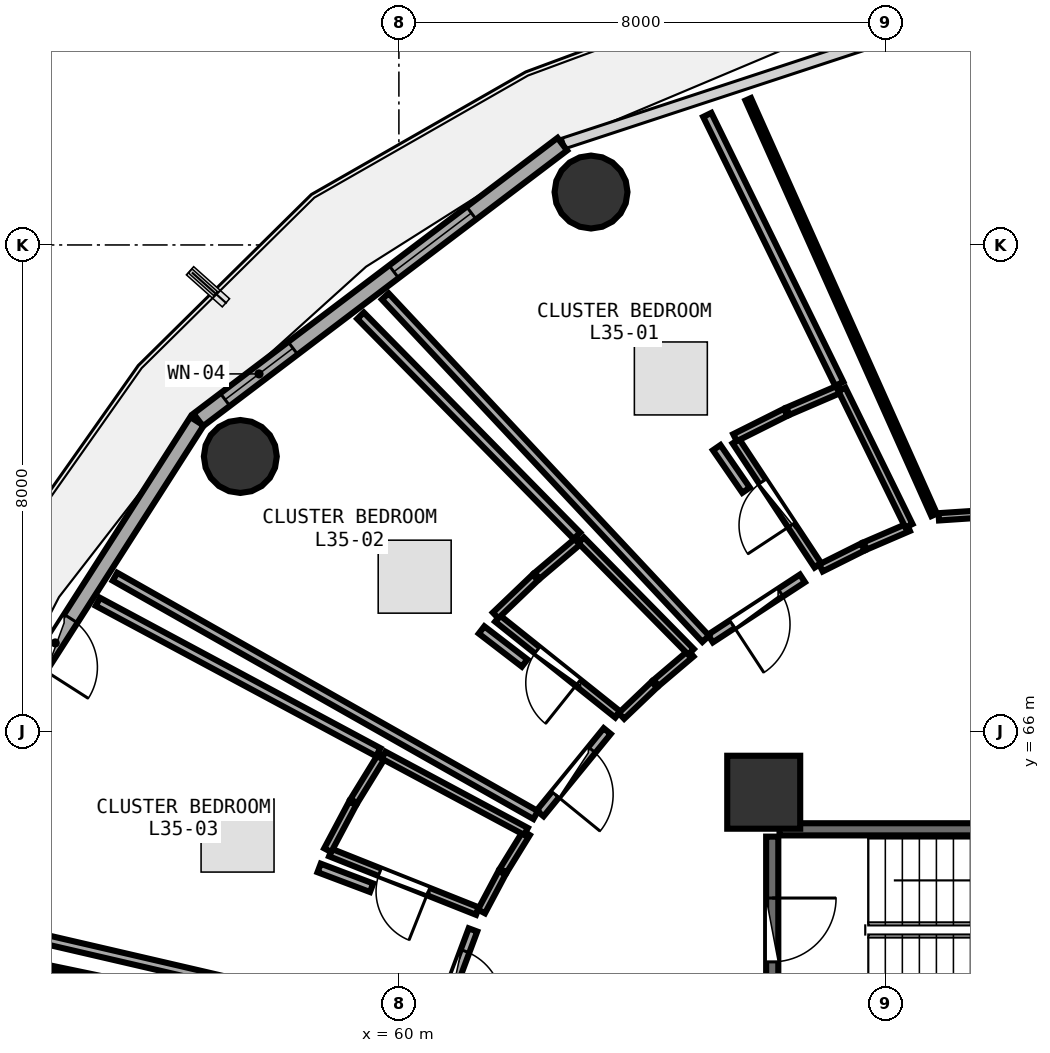
"""IFC4 building model, lengths in metres.
Left out: names, types, materials, properties, quantities, classifications, styles, units other than length and angle.
Written with IfcOpenShell. Run it as: python <this file> out.ifc"""

import sys

from ifc_helpers import new_model, si_unit, direction, frame, frame_2d, origin, origin_2d, place, context, subcontext, project, spatial, rectangle, circle, extrude, element, fill, save


model = new_model("IFC4")
c1 = context("Model", 3, precision=1e-05, world=origin(), true_north=direction((0.0, 1.0)))
c2 = subcontext(c1, "Body", "Model", "MODEL_VIEW")
j1 = project(units=[si_unit("LENGTHUNIT", "METRE"), si_unit("PLANEANGLEUNIT", "RADIAN")], contexts=[c1])
p1 = place(None, origin())
s1 = spatial("IfcSite", under=j1, at=p1, CompositionType="ELEMENT")
p2 = place(p1, origin())
s2 = spatial("IfcBuilding", under=s1, at=p2, CompositionType="ELEMENT")
p3 = place(p2, frame((0.0, 0.0, 139.35)))
s3 = spatial("IfcBuildingStorey", under=s2, at=p3, CompositionType="ELEMENT", Elevation=139.35)
p4 = place(p3, frame((66.0, 65.0, 0.0), z_axis=(0.0, 0.0, 1.0), x_axis=(1.0, 0.0, 0.0)))
e1 = element("IfcColumn", 1, at=p4, inside=s3, PredefinedType="PILASTER", context=c2, shape_type="SweptSolid", body=[
    extrude(rectangle(XDim=1.2, YDim=1.2, at=origin_2d()), origin(), (0.0, 0.0, 1.0), 3.75),
])
for number, where, z_axis, x_axis in (
    (2, (63.16, 74.87, 0.0), (0.0, 0.0, 1.0), (1.0, 0.0, 0.0)),
    (3, (57.392, 70.521, 0.0), (0.0, 0.0, 1.0), (1.0, 0.0, 0.0)),
):
    element("IfcColumn", number, at=place(p3, frame(where, z_axis=z_axis, x_axis=x_axis)), inside=s3, PredefinedType="COLUMN", context=c2, shape_type="SweptSolid", body=[
        extrude(circle(Radius=0.6, at=origin_2d()), origin(), (0.0, 0.0, 1.0), 3.75),
    ])
p5 = place(p3, frame((62.688, 75.658, 0.0), z_axis=(0.0, 0.0, 1.0), x_axis=(-0.797163719609, -0.603763202042, 0.0)))
e4 = element("IfcWall", 4, at=p5, inside=s3, PredefinedType="SOLIDWALL", context=c2, shape_type="SweptSolid", body=[
    extrude(rectangle(XDim=7.512, YDim=0.26, at=frame_2d((3.756, 0.0))), origin(), (0.0, 0.0, 1.0), 3.475),
])
p6 = place(p5, frame((1.876, 0.0, 0.85)))
e5 = element("IfcOpeningElement", 5, at=p6, cuts=e4, PredefinedType="OPENING", context=c2, shape_type="SweptSolid", body=[
    extrude(rectangle(XDim=1.6, YDim=1.45, at=frame_2d((0.8, 0.725))), frame((0.0, 0.14, 0.0), z_axis=(0.0, -1.0, 0.0), x_axis=(1.0, 0.0, 0.0)), (0.0, 0.0, 1.0), 0.28),
])
p7 = place(p5, frame((5.558, 0.0, 0.85)))
e6 = element("IfcOpeningElement", 6, at=p7, cuts=e4, PredefinedType="OPENING", context=c2, shape_type="SweptSolid", body=[
    extrude(rectangle(XDim=1.4, YDim=1.45, at=frame_2d((0.7, 0.725))), frame((0.0, 0.14, 0.0), z_axis=(0.0, -1.0, 0.0), x_axis=(1.0, 0.0, 0.0)), (0.0, 0.0, 1.0), 0.28),
])
p8 = place(p3, frame((56.679, 71.1, 0.0), z_axis=(0.0, 0.0, 1.0), x_axis=(-0.538801521808, -0.842432739213, 0.0)))
e7 = element("IfcWall", 7, at=p8, inside=s3, PredefinedType="SOLIDWALL", context=c2, shape_type="SweptSolid", body=[
    extrude(rectangle(XDim=7.253, YDim=0.26, at=frame_2d((3.627, 0.0))), origin(), (0.0, 0.0, 1.0), 3.475),
])
p9 = place(p8, frame((3.852, 0.0, 0.0)))
e8 = element("IfcOpeningElement", 8, at=p9, cuts=e7, PredefinedType="OPENING", context=c2, shape_type="SweptSolid", body=[
    extrude(rectangle(XDim=0.95, YDim=2.1, at=frame_2d((0.475, 1.05))), frame((0.0, 0.14, 0.0), z_axis=(0.0, -1.0, 0.0), x_axis=(1.0, 0.0, 0.0)), (0.0, 0.0, 1.0), 0.28),
])
p10 = place(p8, frame((5.152, 0.0, 0.85)))
e9 = element("IfcOpeningElement", 9, at=p10, cuts=e7, PredefinedType="OPENING", context=c2, shape_type="SweptSolid", body=[
    extrude(rectangle(XDim=1.2, YDim=1.45, at=frame_2d((0.6, 0.725))), frame((0.0, 0.14, 0.0), z_axis=(0.0, -1.0, 0.0), x_axis=(1.0, 0.0, 0.0)), (0.0, 0.0, 1.0), 0.28),
])
p11 = place(p3, frame((73.42, 64.39, 0.0), z_axis=(0.0, 0.0, 1.0), x_axis=(-1.0, 0.0, 0.0)))
e10 = element("IfcWall", 10, at=p11, inside=s3, PredefinedType="SHEAR", context=c2, shape_type="SweptSolid", body=[
    extrude(rectangle(XDim=7.16, YDim=0.2, at=frame_2d((3.58, 0.0))), origin(), (0.0, 0.0, 1.0), 3.49),
])
p12 = place(p3, frame((66.14, 64.27, 0.0), z_axis=(0.0, 0.0, 1.0), x_axis=(0.0, -1.0, 0.0)))
e11 = element("IfcWall", 11, at=p12, inside=s3, PredefinedType="SHEAR", context=c2, shape_type="SweptSolid", body=[
    extrude(rectangle(XDim=3.07, YDim=0.2, at=frame_2d((1.535, 0.0))), origin(), (0.0, 0.0, 1.0), 3.49),
])
p13 = place(p12, frame((1.01, 0.0, 0.0)))
e12 = element("IfcOpeningElement", 12, at=p13, cuts=e11, PredefinedType="OPENING", context=c2, shape_type="SweptSolid", body=[
    extrude(rectangle(XDim=1.05, YDim=2.1, at=frame_2d((0.525, 1.05))), frame((0.0, 0.11, 0.0), z_axis=(0.0, -1.0, 0.0), x_axis=(1.0, 0.0, 0.0)), (0.0, 0.0, 1.0), 0.22),
])
p14 = place(p3, frame((77.169, 70.083, 0.0), z_axis=(0.0, 0.0, 1.0), x_axis=(-0.997775005058, -0.066671127793, 0.0)))
e13 = element("IfcWall", 13, at=p14, inside=s3, PredefinedType="PARTITIONING", context=c2, shape_type="SweptSolid", body=[
    extrude(rectangle(XDim=8.309, YDim=0.12, at=frame_2d((4.154, 0.0))), origin(), (0.0, 0.0, 1.0), 2.975),
])
p15 = place(p14, frame((3.704, 0.0, 0.0)))
e14 = element("IfcOpeningElement", 14, at=p15, cuts=e13, PredefinedType="OPENING", context=c2, shape_type="SweptSolid", body=[
    extrude(rectangle(XDim=0.9, YDim=2.08, at=frame_2d((0.45, 1.04))), frame((0.0, 0.07, 0.0), z_axis=(0.0, -1.0, 0.0), x_axis=(1.0, 0.0, 0.0)), (0.0, 0.0, 1.0), 0.14),
])
p16 = place(p3, frame((66.891, 68.73, 0.0), z_axis=(0.0, 0.0, 1.0), x_axis=(-0.550825526042, 0.834620416633, 0.0)))
e15 = element("IfcWall", 15, at=p16, inside=s3, PredefinedType="PLUMBINGWALL", context=c2, shape_type="SweptSolid", body=[
    extrude(rectangle(XDim=2.447, YDim=0.13, at=frame_2d((1.223, 0.0))), origin(), (0.0, 0.0, 1.0), 3.235),
])
p17 = place(p16, frame((0.793, 0.0, 0.0)))
e16 = element("IfcOpeningElement", 16, at=p17, cuts=e15, PredefinedType="OPENING", context=c2, shape_type="SweptSolid", body=[
    extrude(rectangle(XDim=0.86, YDim=2.05, at=frame_2d((0.43, 1.025))), frame((0.0, 0.075, 0.0), z_axis=(0.0, -1.0, 0.0), x_axis=(1.0, 0.0, 0.0)), (0.0, 0.0, 1.0), 0.15),
])
p18 = place(p3, frame((66.637, 68.517, 0.0), z_axis=(0.0, 0.0, 1.0), x_axis=(-0.836795974783, -0.547514836864, 0.0)))
e17 = element("IfcWall", 17, at=p18, inside=s3, PredefinedType="PARTITIONING", context=c2, shape_type="SweptSolid", body=[
    extrude(rectangle(XDim=1.809, YDim=0.15, at=frame_2d((0.904, 0.0))), origin(), (0.0, 0.0, 1.0), 2.975),
])
p19 = place(p18, frame((0.429, 0.0, 0.0)))
e18 = element("IfcOpeningElement", 18, at=p19, cuts=e17, PredefinedType="OPENING", context=c2, shape_type="SweptSolid", body=[
    extrude(rectangle(XDim=0.95, YDim=2.08, at=frame_2d((0.475, 1.04))), frame((0.0, 0.085, 0.0), z_axis=(0.0, -1.0, 0.0), x_axis=(1.0, 0.0, 0.0)), (0.0, 0.0, 1.0), 0.17),
])
p20 = place(p3, frame((63.599, 66.278, 0.0), z_axis=(0.0, 0.0, 1.0), x_axis=(-0.781386491078, 0.624047395284, 0.0)))
e19 = element("IfcWall", 19, at=p20, inside=s3, PredefinedType="PLUMBINGWALL", context=c2, shape_type="SweptSolid", body=[
    extrude(rectangle(XDim=2.529, YDim=0.13, at=frame_2d((1.265, 0.0))), origin(), (0.0, 0.0, 1.0), 2.975),
])
p21 = place(p20, frame((0.835, 0.0, 0.0)))
e20 = element("IfcOpeningElement", 20, at=p21, cuts=e19, PredefinedType="OPENING", context=c2, shape_type="SweptSolid", body=[
    extrude(rectangle(XDim=0.86, YDim=2.05, at=frame_2d((0.43, 1.025))), frame((0.0, 0.075, 0.0), z_axis=(0.0, -1.0, 0.0), x_axis=(1.0, 0.0, 0.0)), (0.0, 0.0, 1.0), 0.15),
])
p22 = place(p3, frame((63.426, 66.006, 0.0), z_axis=(0.0, 0.0, 1.0), x_axis=(-0.63192798372, -0.775027111391, 0.0)))
e21 = element("IfcWall", 21, at=p22, inside=s3, PredefinedType="PARTITIONING", context=c2, shape_type="SweptSolid", body=[
    extrude(rectangle(XDim=1.747, YDim=0.15, at=frame_2d((0.874, 0.0))), origin(), (0.0, 0.0, 1.0), 2.975),
])
p23 = place(p22, frame((0.399, 0.0, 0.0)))
e22 = element("IfcOpeningElement", 22, at=p23, cuts=e21, PredefinedType="OPENING", context=c2, shape_type="SweptSolid", body=[
    extrude(rectangle(XDim=0.95, YDim=2.08, at=frame_2d((0.475, 1.04))), frame((0.0, 0.085, 0.0), z_axis=(0.0, -1.0, 0.0), x_axis=(1.0, 0.0, 0.0)), (0.0, 0.0, 1.0), 0.17),
])
p24 = place(p3, frame((61.293, 63.044, 0.0), z_axis=(0.0, 0.0, 1.0), x_axis=(-0.929051463741, 0.369950507123, 0.0)))
e23 = element("IfcWall", 23, at=p24, inside=s3, PredefinedType="PLUMBINGWALL", context=c2, shape_type="SweptSolid", body=[
    extrude(rectangle(XDim=2.602, YDim=0.13, at=frame_2d((1.301, 0.0))), origin(), (0.0, 0.0, 1.0), 3.235),
])
p25 = place(p24, frame((0.871, 0.0, 0.0)))
e24 = element("IfcOpeningElement", 24, at=p25, cuts=e23, PredefinedType="OPENING", context=c2, shape_type="SweptSolid", body=[
    extrude(rectangle(XDim=0.86, YDim=2.05, at=frame_2d((0.43, 1.025))), frame((0.0, 0.075, 0.0), z_axis=(0.0, -1.0, 0.0), x_axis=(1.0, 0.0, 0.0)), (0.0, 0.0, 1.0), 0.15),
])
p26 = place(p3, frame((61.218, 62.736, 0.0), z_axis=(0.0, 0.0, 1.0), x_axis=(-0.349718783302, -0.93685472332, 0.0)))
e25 = element("IfcWall", 25, at=p26, inside=s3, PredefinedType="PARTITIONING", context=c2, shape_type="SweptSolid", body=[
    extrude(rectangle(XDim=1.696, YDim=0.15, at=frame_2d((0.848, 0.0))), origin(), (0.0, 0.0, 1.0), 3.235),
])
p27 = place(p26, frame((0.373, 0.0, 0.0)))
e26 = element("IfcOpeningElement", 26, at=p27, cuts=e25, PredefinedType="OPENING", context=c2, shape_type="SweptSolid", body=[
    extrude(rectangle(XDim=0.95, YDim=2.08, at=frame_2d((0.475, 1.04))), frame((0.0, 0.085, 0.0), z_axis=(0.0, -1.0, 0.0), x_axis=(1.0, 0.0, 0.0)), (0.0, 0.0, 1.0), 0.17),
])
p28 = place(p3, frame((68.803, 69.562, 0.0), z_axis=(0.0, 0.0, 1.0), x_axis=(-0.408373210504, 0.912815052978, 0.0)))
e27 = element("IfcWall", 27, at=p28, inside=s3, PredefinedType="PARTITIONING", context=c2, shape_type="SweptSolid", body=[
    extrude(rectangle(XDim=7.487, YDim=0.1, at=frame_2d((3.743, 0.0))), origin(), (0.0, 0.0, 1.0), 3.025),
])
p29 = place(p3, frame((68.379, 69.356, 0.0), z_axis=(0.0, 0.0, 1.0), x_axis=(-0.918393228723, -0.395668898746, 0.0)))
e28 = element("IfcWall", 28, at=p29, inside=s3, PredefinedType="PLUMBINGWALL", context=c2, shape_type="SweptSolid", body=[
    extrude(rectangle(XDim=0.774, YDim=0.13, at=frame_2d((0.387, 0.0))), origin(), (0.0, 0.0, 1.0), 3.235),
])
p30 = place(p3, frame((67.631, 69.033, 0.0), z_axis=(0.0, 0.0, 1.0), x_axis=(-0.894617251975, -0.446833271443, 0.0)))
e29 = element("IfcWall", 29, at=p30, inside=s3, PredefinedType="PLUMBINGWALL", context=c2, shape_type="SweptSolid", body=[
    extrude(rectangle(XDim=0.771, YDim=0.13, at=frame_2d((0.385, 0.0))), origin(), (0.0, 0.0, 1.0), 3.235),
])
p31 = place(p3, frame((65.528, 70.831, 0.0), z_axis=(0.0, 0.0, 1.0), x_axis=(0.894269924497, 0.447527990343, 0.0)))
e30 = element("IfcWall", 30, at=p31, inside=s3, PredefinedType="PLUMBINGWALL", context=c2, shape_type="SweptSolid", body=[
    extrude(rectangle(XDim=0.932, YDim=0.13, at=frame_2d((0.466, 0.0))), origin(), (0.0, 0.0, 1.0), 3.175),
])
p32 = place(p3, frame((66.397, 71.265, 0.0), z_axis=(0.0, 0.0, 1.0), x_axis=(0.918726840833, 0.394893646357, 0.0)))
e31 = element("IfcWall", 31, at=p32, inside=s3, PredefinedType="PLUMBINGWALL", context=c2, shape_type="SweptSolid", body=[
    extrude(rectangle(XDim=0.937, YDim=0.13, at=frame_2d((0.469, 0.0))), origin(), (0.0, 0.0, 1.0), 3.175),
])
p33 = place(p3, frame((67.286, 71.625, 0.0), z_axis=(0.0, 0.0, 1.0), x_axis=(0.441029506653, -0.897492604015, 0.0)))
e32 = element("IfcWall", 32, at=p33, inside=s3, PredefinedType="PLUMBINGWALL", context=c2, shape_type="SweptSolid", body=[
    extrude(rectangle(XDim=2.499, YDim=0.13, at=frame_2d((1.25, 0.0))), origin(), (0.0, 0.0, 1.0), 3.175),
])
p34 = place(p3, frame((65.046, 67.523, 0.0), z_axis=(0.0, 0.0, 1.0), x_axis=(-0.683295427563, 0.730142012674, 0.0)))
e33 = element("IfcWall", 33, at=p34, inside=s3, PredefinedType="PARTITIONING", context=c2, shape_type="SweptSolid", body=[
    extrude(rectangle(XDim=7.713, YDim=0.15, at=frame_2d((3.856, 0.0))), origin(), (0.0, 0.0, 1.0), 3.025),
])
p35 = place(p3, frame((65.072, 76.139, 0.0), z_axis=(0.0, 0.0, 1.0), x_axis=(0.440581721025, -0.897712508044, 0.0)))
e34 = element("IfcWall", 34, at=p35, inside=s3, PredefinedType="PARTITIONING", context=c2, shape_type="SweptSolid", body=[
    extrude(rectangle(XDim=4.927, YDim=0.15, at=frame_2d((2.464, 0.0))), origin(), (0.0, 0.0, 1.0), 3.025),
])
p36 = place(p3, frame((65.227, 70.667, 0.0), z_axis=(0.0, 0.0, 1.0), x_axis=(0.567880544382, -0.823110981164, 0.0)))
e35 = element("IfcWall", 35, at=p36, inside=s3, PredefinedType="PARTITIONING", context=c2, shape_type="SweptSolid", body=[
    extrude(rectangle(XDim=0.85, YDim=0.15, at=frame_2d((0.425, 0.0))), origin(), (0.0, 0.0, 1.0), 3.48),
])
p37 = place(p3, frame((64.803, 67.282, 0.0), z_axis=(0.0, 0.0, 1.0), x_axis=(-0.762941836055, -0.646467133578, 0.0)))
e36 = element("IfcWall", 36, at=p37, inside=s3, PredefinedType="PLUMBINGWALL", context=c2, shape_type="SweptSolid", body=[
    extrude(rectangle(XDim=0.75, YDim=0.13, at=frame_2d((0.375, 0.0))), origin(), (0.0, 0.0, 1.0), 3.48),
])
p38 = place(p3, frame((64.2, 66.77, 0.0), z_axis=(0.0, 0.0, 1.0), x_axis=(-0.723429788657, -0.690397958343, 0.0)))
e37 = element("IfcWall", 37, at=p38, inside=s3, PredefinedType="PLUMBINGWALL", context=c2, shape_type="SweptSolid", body=[
    extrude(rectangle(XDim=0.747, YDim=0.13, at=frame_2d((0.373, 0.0))), origin(), (0.0, 0.0, 1.0), 2.975),
])
p39 = place(p3, frame((61.591, 67.908, 0.0), z_axis=(0.0, 0.0, 1.0), x_axis=(0.722606643047, 0.691259458831, 0.0)))
e38 = element("IfcWall", 38, at=p39, inside=s3, PredefinedType="PLUMBINGWALL", context=c2, shape_type="SweptSolid", body=[
    extrude(rectangle(XDim=0.903, YDim=0.13, at=frame_2d((0.452, 0.0))), origin(), (0.0, 0.0, 1.0), 2.975),
])
p40 = place(p3, frame((62.273, 68.559, 0.0), z_axis=(0.0, 0.0, 1.0), x_axis=(0.763243602663, 0.646110828724, 0.0)))
e39 = element("IfcWall", 39, at=p40, inside=s3, PredefinedType="PLUMBINGWALL", context=c2, shape_type="SweptSolid", body=[
    extrude(rectangle(XDim=0.909, YDim=0.13, at=frame_2d((0.454, 0.0))), origin(), (0.0, 0.0, 1.0), 3.48),
])
p41 = place(p3, frame((62.996, 69.145, 0.0), z_axis=(0.0, 0.0, 1.0), x_axis=(0.701684931383, -0.712487373271, 0.0)))
e40 = element("IfcWall", 40, at=p41, inside=s3, PredefinedType="PLUMBINGWALL", context=c2, shape_type="SweptSolid", body=[
    extrude(rectangle(XDim=2.576, YDim=0.13, at=frame_2d((1.288, 0.0))), origin(), (0.0, 0.0, 1.0), 3.235),
])
p42 = place(p3, frame((62.249, 64.625, 0.0), z_axis=(0.0, 0.0, 1.0), x_axis=(-0.870077493263, 0.492914957896, 0.0)))
e41 = element("IfcWall", 41, at=p42, inside=s3, PredefinedType="PARTITIONING", context=c2, shape_type="SweptSolid", body=[
    extrude(rectangle(XDim=7.952, YDim=0.15, at=frame_2d((3.976, 0.0))), origin(), (0.0, 0.0, 1.0), 2.975),
])
p43 = place(p3, frame((59.369, 72.837, 0.0), z_axis=(0.0, 0.0, 1.0), x_axis=(0.701093902079, -0.713068959125, 0.0)))
e42 = element("IfcWall", 42, at=p43, inside=s3, PredefinedType="PARTITIONING", context=c2, shape_type="SweptSolid", body=[
    extrude(rectangle(XDim=5.076, YDim=0.15, at=frame_2d((2.538, 0.0))), origin(), (0.0, 0.0, 1.0), 3.025),
])
p44 = place(p3, frame((61.36, 67.669, 0.0), z_axis=(0.0, 0.0, 1.0), x_axis=(0.793020417561, -0.609195056884, 0.0)))
e43 = element("IfcWall", 43, at=p44, inside=s3, PredefinedType="PARTITIONING", context=c2, shape_type="SweptSolid", body=[
    extrude(rectangle(XDim=0.893, YDim=0.15, at=frame_2d((0.446, 0.0))), origin(), (0.0, 0.0, 1.0), 3.48),
])
p45 = place(p3, frame((62.097, 64.329, 0.0), z_axis=(0.0, 0.0, 1.0), x_axis=(-0.524547607878, -0.851381117402, 0.0)))
e44 = element("IfcWall", 44, at=p45, inside=s3, PredefinedType="PLUMBINGWALL", context=c2, shape_type="SweptSolid", body=[
    extrude(rectangle(XDim=0.726, YDim=0.13, at=frame_2d((0.363, 0.0))), origin(), (0.0, 0.0, 1.0), 3.48),
])
p46 = place(p3, frame((61.697, 63.676, 0.0), z_axis=(0.0, 0.0, 1.0), x_axis=(-0.469163481751, -0.88311133352, 0.0)))
e45 = element("IfcWall", 45, at=p46, inside=s3, PredefinedType="PLUMBINGWALL", context=c2, shape_type="SweptSolid", body=[
    extrude(rectangle(XDim=0.721, YDim=0.13, at=frame_2d((0.36, 0.0))), origin(), (0.0, 0.0, 1.0), 3.48),
])
p47 = place(p3, frame((58.829, 64.047, 0.0), z_axis=(0.0, 0.0, 1.0), x_axis=(0.469311809042, 0.883032516895, 0.0)))
e46 = element("IfcWall", 46, at=p47, inside=s3, PredefinedType="PLUMBINGWALL", context=c2, shape_type="SweptSolid", body=[
    extrude(rectangle(XDim=0.874, YDim=0.13, at=frame_2d((0.437, 0.0))), origin(), (0.0, 0.0, 1.0), 2.975),
])
p48 = place(p3, frame((59.26, 64.853, 0.0), z_axis=(0.0, 0.0, 1.0), x_axis=(0.524097425664, 0.851658316705, 0.0)))
e47 = element("IfcWall", 47, at=p48, inside=s3, PredefinedType="PLUMBINGWALL", context=c2, shape_type="SweptSolid", body=[
    extrude(rectangle(XDim=0.879, YDim=0.13, at=frame_2d((0.44, 0.0))), origin(), (0.0, 0.0, 1.0), 2.975),
])
p49 = place(p3, frame((59.749, 65.61, 0.0), z_axis=(0.0, 0.0, 1.0), x_axis=(0.881540078275, -0.472109193296, 0.0)))
e48 = element("IfcWall", 48, at=p49, inside=s3, PredefinedType="PLUMBINGWALL", context=c2, shape_type="SweptSolid", body=[
    extrude(rectangle(XDim=2.656, YDim=0.13, at=frame_2d((1.328, 0.0))), origin(), (0.0, 0.0, 1.0), 2.975),
])
p50 = place(p3, frame((60.565, 61.1, 0.0), z_axis=(0.0, 0.0, 1.0), x_axis=(-0.97414388338, 0.225928516292, 0.0)))
e49 = element("IfcWall", 49, at=p50, inside=s3, PredefinedType="PARTITIONING", context=c2, shape_type="SweptSolid", body=[
    extrude(rectangle(XDim=8.122, YDim=0.15, at=frame_2d((4.061, 0.0))), origin(), (0.0, 0.0, 1.0), 3.025),
])
p51 = place(p3, frame((55.049, 68.131, 0.0), z_axis=(0.0, 0.0, 1.0), x_axis=(0.881257916537, -0.472635678447, 0.0)))
e50 = element("IfcWall", 50, at=p51, inside=s3, PredefinedType="PARTITIONING", context=c2, shape_type="SweptSolid", body=[
    extrude(rectangle(XDim=5.233, YDim=0.15, at=frame_2d((2.616, 0.0))), origin(), (0.0, 0.0, 1.0), 3.025),
])
p52 = place(p3, frame((58.688, 63.755, 0.0), z_axis=(0.0, 0.0, 1.0), x_axis=(0.935532386314, -0.353240929336, 0.0)))
e51 = element("IfcWall", 51, at=p52, inside=s3, PredefinedType="PARTITIONING", context=c2, shape_type="SweptSolid", body=[
    extrude(rectangle(XDim=0.922, YDim=0.15, at=frame_2d((0.461, 0.0))), origin(), (0.0, 0.0, 1.0), 3.48),
])
p53 = place(p3, frame((52.525, 62.464, 0.0), z_axis=(0.0, 0.0, 1.0), x_axis=(0.978946183013, -0.204118521367, 0.0)))
e52 = element("IfcWall", 52, at=p53, inside=s3, PredefinedType="PARTITIONING", context=c2, shape_type="SweptSolid", body=[
    extrude(rectangle(XDim=8.131, YDim=0.1, at=frame_2d((4.065, 0.0))), origin(), (0.0, 0.0, 1.0), 3.025),
])
p54 = place(p6, origin())
e53 = element("IfcWindow", 53, at=p54, inside=s3, PartitioningType="SINGLE_PANEL", PredefinedType="WINDOW", context=c2, shape_type="SweptSolid", body=[
    extrude(rectangle(XDim=1.6, YDim=1.45, at=frame_2d((0.8, 0.725))), frame((0.0, 0.03, 0.0), z_axis=(0.0, -1.0, 0.0), x_axis=(1.0, 0.0, 0.0)), (0.0, 0.0, 1.0), 0.06),
])
fill(e5, e53)
p55 = place(p9, frame((0.95, 0.0, 0.0), z_axis=(0.0, 0.0, 1.0), x_axis=(-1.0, 0.0, 0.0)))
e54 = element("IfcDoor", 54, at=p55, inside=s3, OperationType="SINGLE_SWING_LEFT", PredefinedType="DOOR", context=c2, shape_type="SweptSolid", body=[
    extrude(rectangle(XDim=0.95, YDim=2.1, at=frame_2d((0.475, 1.05))), frame((0.0, 0.025, 0.0), z_axis=(0.0, -1.0, 0.0), x_axis=(1.0, 0.0, 0.0)), (0.0, 0.0, 1.0), 0.05),
])
fill(e8, e54)
p56 = place(p7, origin())
e55 = element("IfcWindow", 55, at=p56, inside=s3, PartitioningType="SINGLE_PANEL", PredefinedType="WINDOW", context=c2, shape_type="SweptSolid", body=[
    extrude(rectangle(XDim=1.4, YDim=1.45, at=frame_2d((0.7, 0.725))), frame((0.0, 0.03, 0.0), z_axis=(0.0, -1.0, 0.0), x_axis=(1.0, 0.0, 0.0)), (0.0, 0.0, 1.0), 0.06),
])
fill(e6, e55)
p57 = place(p13, origin())
e56 = element("IfcDoor", 56, at=p57, inside=s3, OperationType="SINGLE_SWING_LEFT", PredefinedType="DOOR", context=c2, shape_type="SweptSolid", body=[
    extrude(rectangle(XDim=1.05, YDim=2.1, at=frame_2d((0.525, 1.05))), frame((0.0, 0.025, 0.0), z_axis=(0.0, -1.0, 0.0), x_axis=(1.0, 0.0, 0.0)), (0.0, 0.0, 1.0), 0.05),
])
fill(e12, e56)
p58 = place(p17, origin())
e57 = element("IfcDoor", 57, at=p58, inside=s3, OperationType="SINGLE_SWING_LEFT", PredefinedType="DOOR", context=c2, shape_type="SweptSolid", body=[
    extrude(rectangle(XDim=0.86, YDim=2.05, at=frame_2d((0.43, 1.025))), frame((0.0, 0.025, 0.0), z_axis=(0.0, -1.0, 0.0), x_axis=(1.0, 0.0, 0.0)), (0.0, 0.0, 1.0), 0.05),
])
fill(e16, e57)
p59 = place(p19, origin())
e58 = element("IfcDoor", 58, at=p59, inside=s3, OperationType="SINGLE_SWING_RIGHT", PredefinedType="DOOR", context=c2, shape_type="SweptSolid", body=[
    extrude(rectangle(XDim=0.95, YDim=2.08, at=frame_2d((0.475, 1.04))), frame((0.0, 0.025, 0.0), z_axis=(0.0, -1.0, 0.0), x_axis=(1.0, 0.0, 0.0)), (0.0, 0.0, 1.0), 0.05),
])
fill(e18, e58)
p60 = place(p21, origin())
e59 = element("IfcDoor", 59, at=p60, inside=s3, OperationType="SINGLE_SWING_LEFT", PredefinedType="DOOR", context=c2, shape_type="SweptSolid", body=[
    extrude(rectangle(XDim=0.86, YDim=2.05, at=frame_2d((0.43, 1.025))), frame((0.0, 0.025, 0.0), z_axis=(0.0, -1.0, 0.0), x_axis=(1.0, 0.0, 0.0)), (0.0, 0.0, 1.0), 0.05),
])
fill(e20, e59)
p61 = place(p23, origin())
e60 = element("IfcDoor", 60, at=p61, inside=s3, OperationType="SINGLE_SWING_RIGHT", PredefinedType="DOOR", context=c2, shape_type="SweptSolid", body=[
    extrude(rectangle(XDim=0.95, YDim=2.08, at=frame_2d((0.475, 1.04))), frame((0.0, 0.025, 0.0), z_axis=(0.0, -1.0, 0.0), x_axis=(1.0, 0.0, 0.0)), (0.0, 0.0, 1.0), 0.05),
])
fill(e22, e60)
p62 = place(p25, origin())
e61 = element("IfcDoor", 61, at=p62, inside=s3, OperationType="SINGLE_SWING_LEFT", PredefinedType="DOOR", context=c2, shape_type="SweptSolid", body=[
    extrude(rectangle(XDim=0.86, YDim=2.05, at=frame_2d((0.43, 1.025))), frame((0.0, 0.025, 0.0), z_axis=(0.0, -1.0, 0.0), x_axis=(1.0, 0.0, 0.0)), (0.0, 0.0, 1.0), 0.05),
])
fill(e24, e61)
p63 = place(p27, origin())
e62 = element("IfcDoor", 62, at=p63, inside=s3, OperationType="SINGLE_SWING_RIGHT", PredefinedType="DOOR", context=c2, shape_type="SweptSolid", body=[
    extrude(rectangle(XDim=0.95, YDim=2.08, at=frame_2d((0.475, 1.04))), frame((0.0, 0.025, 0.0), z_axis=(0.0, -1.0, 0.0), x_axis=(1.0, 0.0, 0.0)), (0.0, 0.0, 1.0), 0.05),
])
fill(e26, e62)
save(model, sys.argv[1])
